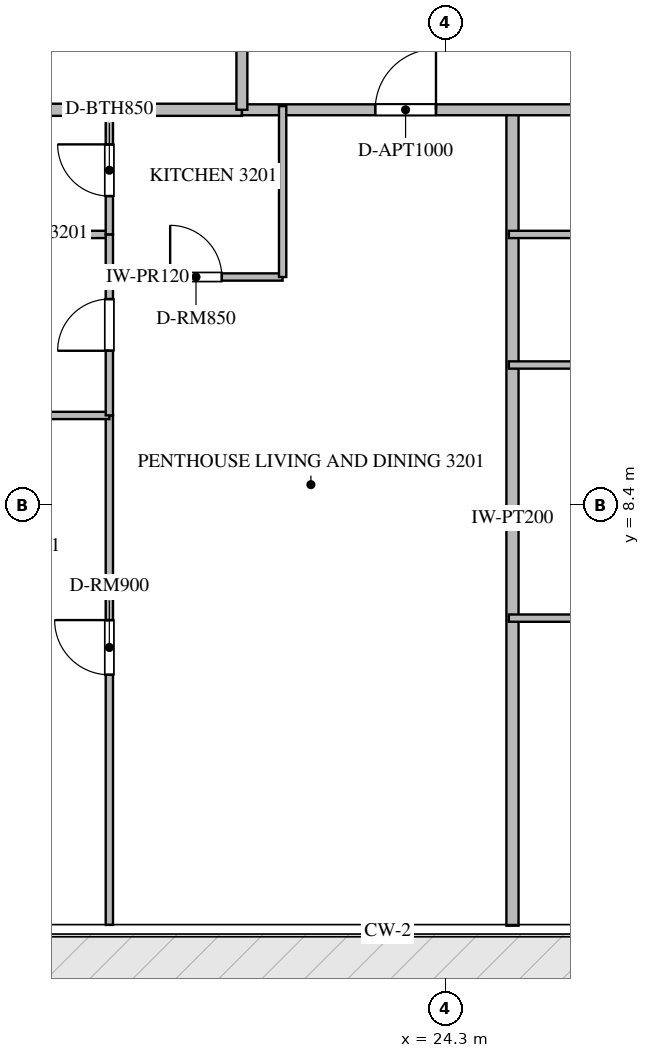
"""IFC4 building model, lengths in metres.
Left out: names, types, materials, properties, quantities, classifications, styles, units other than length and angle.
Written with IfcOpenShell. Run it as: python <this file> out.ifc"""

import sys

from ifc_helpers import new_model, si_unit, direction, frame, frame_2d, origin, place, context, subcontext, project, spatial, rectangle, extrude, source, transform, mapped, element, fill, save


model = new_model("IFC4")
c1 = context("Model", 3, precision=1e-05, world=origin(), true_north=direction((0.0, 1.0)))
c2 = subcontext(c1, "Body", "Model", "MODEL_VIEW")
j1 = project(units=[si_unit("LENGTHUNIT", "METRE"), si_unit("PLANEANGLEUNIT", "RADIAN")], contexts=[c1])
p1 = place(None, origin())
s1 = spatial("IfcSite", under=j1, at=p1, CompositionType="ELEMENT")
p2 = place(p1, origin())
s2 = spatial("IfcBuilding", under=s1, at=p2, CompositionType="ELEMENT")
p3 = place(p2, frame((0.0, 0.0, 131.4)))
s3 = spatial("IfcBuildingStorey", under=s2, at=p3, CompositionType="ELEMENT", Elevation=131.4)
p4 = place(p3, frame((25.4, 1.482, 0.0), z_axis=(0.0, 0.0, 1.0), x_axis=(0.0, 1.0, 0.0)))
e1 = element("IfcWall", 1, at=p4, inside=s3, PredefinedType="PARTITIONING", context=c2, shape_type="SweptSolid", body=[
    extrude(rectangle(XDim=13.418, YDim=0.2, at=frame_2d((6.709, 0.0))), origin(), (0.0, 0.0, 1.0), 3.49),
])
p5 = place(p3, frame((7.882, 14.9, 0.0), z_axis=(0.0, 0.0, 1.0), x_axis=(1.0, 0.0, 0.0)))
e2 = element("IfcWall", 2, at=p5, inside=s3, PredefinedType="PARTITIONING", context=c2, shape_type="SweptSolid", body=[
    extrude(rectangle(XDim=13.068, YDim=0.2, at=frame_2d((6.534, 0.0))), origin(), (0.0, 0.0, 1.0), 3.49),
])
p6 = place(p3, frame((20.952, 14.9, 0.0), z_axis=(0.0, 0.0, 1.0), x_axis=(1.0, 0.0, 0.0)))
e3 = element("IfcWall", 3, at=p6, inside=s3, PredefinedType="PARTITIONING", context=c2, shape_type="SweptSolid", body=[
    extrude(rectangle(XDim=22.896, YDim=0.18, at=frame_2d((11.448, 0.0))), origin(), (0.0, 0.0, 1.0), 3.49),
])
p7 = place(p6, frame((2.19, 0.0, 0.0)))
e4 = element("IfcOpeningElement", 4, at=p7, cuts=e3, PredefinedType="OPENING", context=c2, shape_type="SweptSolid", body=[
    extrude(rectangle(XDim=1.0, YDim=2.15, at=frame_2d((0.5, 1.075))), frame((0.0, 0.1, 0.0), z_axis=(0.0, -1.0, 0.0), x_axis=(1.0, 0.0, 0.0)), (0.0, 0.0, 1.0), 0.2),
])
p8 = place(p6, frame((14.955, 0.0, 0.0)))
e5 = element("IfcOpeningElement", 5, at=p8, cuts=e3, PredefinedType="OPENING", context=c2, shape_type="SweptSolid", body=[
    extrude(rectangle(XDim=1.0, YDim=2.15, at=frame_2d((0.5, 1.075))), frame((0.0, 0.1, 0.0), z_axis=(0.0, -1.0, 0.0), x_axis=(1.0, 0.0, 0.0)), (0.0, 0.0, 1.0), 0.2),
])
p9 = place(p6, frame((19.509, 0.0, 0.0)))
e6 = element("IfcOpeningElement", 6, at=p9, cuts=e3, PredefinedType="OPENING", context=c2, shape_type="SweptSolid", body=[
    extrude(rectangle(XDim=1.0, YDim=2.15, at=frame_2d((0.5, 1.075))), frame((0.0, 0.1, 0.0), z_axis=(0.0, -1.0, 0.0), x_axis=(1.0, 0.0, 0.0)), (0.0, 0.0, 1.0), 0.2),
])
p10 = place(p3, frame((20.95, 14.9, 0.0), z_axis=(0.0, 0.0, 1.0), x_axis=(0.0, 1.0, 0.0)))
e7 = element("IfcWall", 7, at=p10, inside=s3, PredefinedType="PARTITIONING", context=c2, shape_type="SweptSolid", body=[
    extrude(rectangle(XDim=18.7, YDim=0.18, at=frame_2d((9.35, 0.0))), origin(), (0.0, 0.0, 1.0), 3.49),
])
p11 = place(p10, frame((1.805, 0.0, 0.0)))
e8 = element("IfcOpeningElement", 8, at=p11, cuts=e7, PredefinedType="OPENING", context=c2, shape_type="SweptSolid", body=[
    extrude(rectangle(XDim=1.0, YDim=2.15, at=frame_2d((0.5, 1.075))), frame((0.0, 0.1, 0.0), z_axis=(0.0, -1.0, 0.0), x_axis=(1.0, 0.0, 0.0)), (0.0, 0.0, 1.0), 0.2),
])
p12 = place(p10, frame((14.726, 0.0, 0.0)))
e9 = element("IfcOpeningElement", 9, at=p12, cuts=e7, PredefinedType="OPENING", context=c2, shape_type="SweptSolid", body=[
    extrude(rectangle(XDim=1.0, YDim=2.15, at=frame_2d((0.5, 1.075))), frame((0.0, 0.1, 0.0), z_axis=(0.0, -1.0, 0.0), x_axis=(1.0, 0.0, 0.0)), (0.0, 0.0, 1.0), 0.2),
])
p13 = place(p3, frame((18.77, 12.15, 0.0), z_axis=(0.0, 0.0, 1.0), x_axis=(1.0, 0.0, 0.0)))
e10 = element("IfcWall", 10, at=p13, inside=s3, PredefinedType="PARTITIONING", context=c2, shape_type="SweptSolid", body=[
    extrude(rectangle(XDim=2.85, YDim=0.12, at=frame_2d((1.425, 0.0))), origin(), (0.0, 0.0, 1.0), 3.49),
])
p14 = place(p13, frame((1.0, 0.0, 0.0)))
e11 = element("IfcOpeningElement", 11, at=p14, cuts=e10, PredefinedType="OPENING", context=c2, shape_type="SweptSolid", body=[
    extrude(rectangle(XDim=0.85, YDim=2.1, at=frame_2d((0.425, 1.05))), frame((0.0, 0.07, 0.0), z_axis=(0.0, -1.0, 0.0), x_axis=(1.0, 0.0, 0.0)), (0.0, 0.0, 1.0), 0.14),
])
p15 = place(p3, frame((21.62, 12.15, 0.0), z_axis=(0.0, 0.0, 1.0), x_axis=(0.0, 1.0, 0.0)))
e12 = element("IfcWall", 12, at=p15, inside=s3, PredefinedType="PARTITIONING", context=c2, shape_type="SweptSolid", body=[
    extrude(rectangle(XDim=2.81, YDim=0.12, at=frame_2d((1.405, 0.0))), origin(), (0.0, 0.0, 1.0), 3.49),
])
p16 = place(p3, frame((18.77, 1.495, 0.0), z_axis=(0.0, 0.0, 1.0), x_axis=(0.0, 1.0, 0.0)))
e13 = element("IfcWall", 13, at=p16, inside=s3, PredefinedType="PARTITIONING", context=c2, shape_type="SweptSolid", body=[
    extrude(rectangle(XDim=8.378, YDim=0.12, at=frame_2d((4.189, 0.0))), origin(), (0.0, 0.0, 1.0), 3.49),
])
p17 = place(p16, frame((4.113, 0.0, 0.0)))
e14 = element("IfcOpeningElement", 14, at=p17, cuts=e13, PredefinedType="OPENING", context=c2, shape_type="SweptSolid", body=[
    extrude(rectangle(XDim=0.9, YDim=2.1, at=frame_2d((0.45, 1.05))), frame((0.0, 0.07, 0.0), z_axis=(0.0, -1.0, 0.0), x_axis=(1.0, 0.0, 0.0)), (0.0, 0.0, 1.0), 0.14),
])
p18 = place(p3, frame((7.895, 9.873, 0.0), z_axis=(0.0, 0.0, 1.0), x_axis=(1.0, 0.0, 0.0)))
e15 = element("IfcWall", 15, at=p18, inside=s3, PredefinedType="PARTITIONING", context=c2, shape_type="SweptSolid", body=[
    extrude(rectangle(XDim=10.875, YDim=0.12, at=frame_2d((5.438, 0.0))), origin(), (0.0, 0.0, 1.0), 3.49),
])
p19 = place(p3, frame((15.57, 12.85, 0.0), z_axis=(0.0, 0.0, 1.0), x_axis=(1.0, 0.0, 0.0)))
e16 = element("IfcWall", 16, at=p19, inside=s3, PredefinedType="PARTITIONING", context=c2, shape_type="SweptSolid", body=[
    extrude(rectangle(XDim=3.2, YDim=0.12, at=frame_2d((1.6, 0.0))), origin(), (0.0, 0.0, 1.0), 3.49),
])
p20 = place(p3, frame((18.77, 9.875, 0.0), z_axis=(0.0, 0.0, 1.0), x_axis=(0.0, 1.0, 0.0)))
e17 = element("IfcWall", 17, at=p20, inside=s3, PredefinedType="PARTITIONING", context=c2, shape_type="SweptSolid", body=[
    extrude(rectangle(XDim=2.975, YDim=0.12, at=frame_2d((1.488, 0.0))), origin(), (0.0, 0.0, 1.0), 3.49),
])
p21 = place(p20, frame((1.062, 0.0, 0.0)))
e18 = element("IfcOpeningElement", 18, at=p21, cuts=e17, PredefinedType="OPENING", context=c2, shape_type="SweptSolid", body=[
    extrude(rectangle(XDim=0.85, YDim=2.1, at=frame_2d((0.425, 1.05))), frame((0.0, 0.07, 0.0), z_axis=(0.0, -1.0, 0.0), x_axis=(1.0, 0.0, 0.0)), (0.0, 0.0, 1.0), 0.14),
])
p22 = place(p3, frame((18.77, 12.852, 0.0), z_axis=(0.0, 0.0, 1.0), x_axis=(0.0, 1.0, 0.0)))
e19 = element("IfcWall", 19, at=p22, inside=s3, PredefinedType="PARTITIONING", context=c2, shape_type="SweptSolid", body=[
    extrude(rectangle(XDim=2.108, YDim=0.12, at=frame_2d((1.054, 0.0))), origin(), (0.0, 0.0, 1.0), 3.49),
])
p23 = place(p22, frame((0.629, 0.0, 0.0)))
e20 = element("IfcOpeningElement", 20, at=p23, cuts=e19, PredefinedType="OPENING", context=c2, shape_type="SweptSolid", body=[
    extrude(rectangle(XDim=0.85, YDim=2.1, at=frame_2d((0.425, 1.05))), frame((0.0, 0.07, 0.0), z_axis=(0.0, -1.0, 0.0), x_axis=(1.0, 0.0, 0.0)), (0.0, 0.0, 1.0), 0.14),
])
for number, where, z_axis, x_axis in (
    (21, (25.34, 6.54, 0.0), (0.0, 0.0, 1.0), (1.0, 0.0, 0.0)),
    (22, (25.34, 10.703, 0.0), (0.0, 0.0, 1.0), (1.0, 0.0, 0.0)),
    (23, (25.34, 12.85, 0.0), (0.0, 0.0, 1.0), (1.0, 0.0, 0.0)),
):
    element("IfcWall", number, at=place(p3, frame(where, z_axis=z_axis, x_axis=x_axis)), inside=s3, PredefinedType="PARTITIONING", context=c2, shape_type="SweptSolid", body=[
        extrude(rectangle(XDim=8.49, YDim=0.12, at=frame_2d((4.245, 0.0))), origin(), (0.0, 0.0, 1.0), 3.49),
    ])
m1 = source(origin(), c2, "Body", "SweptSolid", [
    extrude(rectangle(XDim=1.0, YDim=2.15, at=frame_2d((0.5, 1.075))), frame((0.0, 0.025, 0.0), z_axis=(0.0, -1.0, 0.0), x_axis=(1.0, 0.0, 0.0)), (0.0, 0.0, 1.0), 0.05),
])
p24 = place(p7, origin())
e24 = element("IfcDoor", 24, at=p24, inside=s3, OperationType="SINGLE_SWING_RIGHT", PredefinedType="DOOR", context=c2, shape_type="MappedRepresentation", body=[
    mapped(m1, transform((0.0, 0.0, 0.0), scale=1.0)),
])
fill(e4, e24)
m2 = source(origin(), c2, "Body", "SweptSolid", [
    extrude(rectangle(XDim=0.85, YDim=2.1, at=frame_2d((0.425, 1.05))), frame((0.0, 0.025, 0.0), z_axis=(0.0, -1.0, 0.0), x_axis=(1.0, 0.0, 0.0)), (0.0, 0.0, 1.0), 0.05),
])
p25 = place(p14, origin())
e25 = element("IfcDoor", 25, at=p25, inside=s3, OperationType="SINGLE_SWING_LEFT", PredefinedType="DOOR", context=c2, shape_type="MappedRepresentation", body=[
    mapped(m2, transform((0.0, 0.0, 0.0), scale=1.0)),
])
fill(e11, e25)
m3 = source(origin(), c2, "Body", "SweptSolid", [
    extrude(rectangle(XDim=0.9, YDim=2.1, at=frame_2d((0.45, 1.05))), frame((0.0, 0.025, 0.0), z_axis=(0.0, -1.0, 0.0), x_axis=(1.0, 0.0, 0.0)), (0.0, 0.0, 1.0), 0.05),
])
p26 = place(p17, origin())
e26 = element("IfcDoor", 26, at=p26, inside=s3, OperationType="SINGLE_SWING_RIGHT", PredefinedType="DOOR", context=c2, shape_type="MappedRepresentation", body=[
    mapped(m3, transform((0.0, 0.0, 0.0), scale=1.0)),
])
fill(e14, e26)
p27 = place(p21, origin())
e27 = element("IfcDoor", 27, at=p27, inside=s3, OperationType="SINGLE_SWING_LEFT", PredefinedType="DOOR", context=c2, shape_type="MappedRepresentation", body=[
    mapped(m2, transform((0.0, 0.0, 0.0), scale=1.0)),
])
fill(e18, e27)
p28 = place(p23, origin())
e28 = element("IfcDoor", 28, at=p28, inside=s3, OperationType="SINGLE_SWING_RIGHT", PredefinedType="DOOR", context=c2, shape_type="MappedRepresentation", body=[
    mapped(m2, transform((0.0, 0.0, 0.0), scale=1.0)),
])
fill(e20, e28)
save(model, sys.argv[1])
